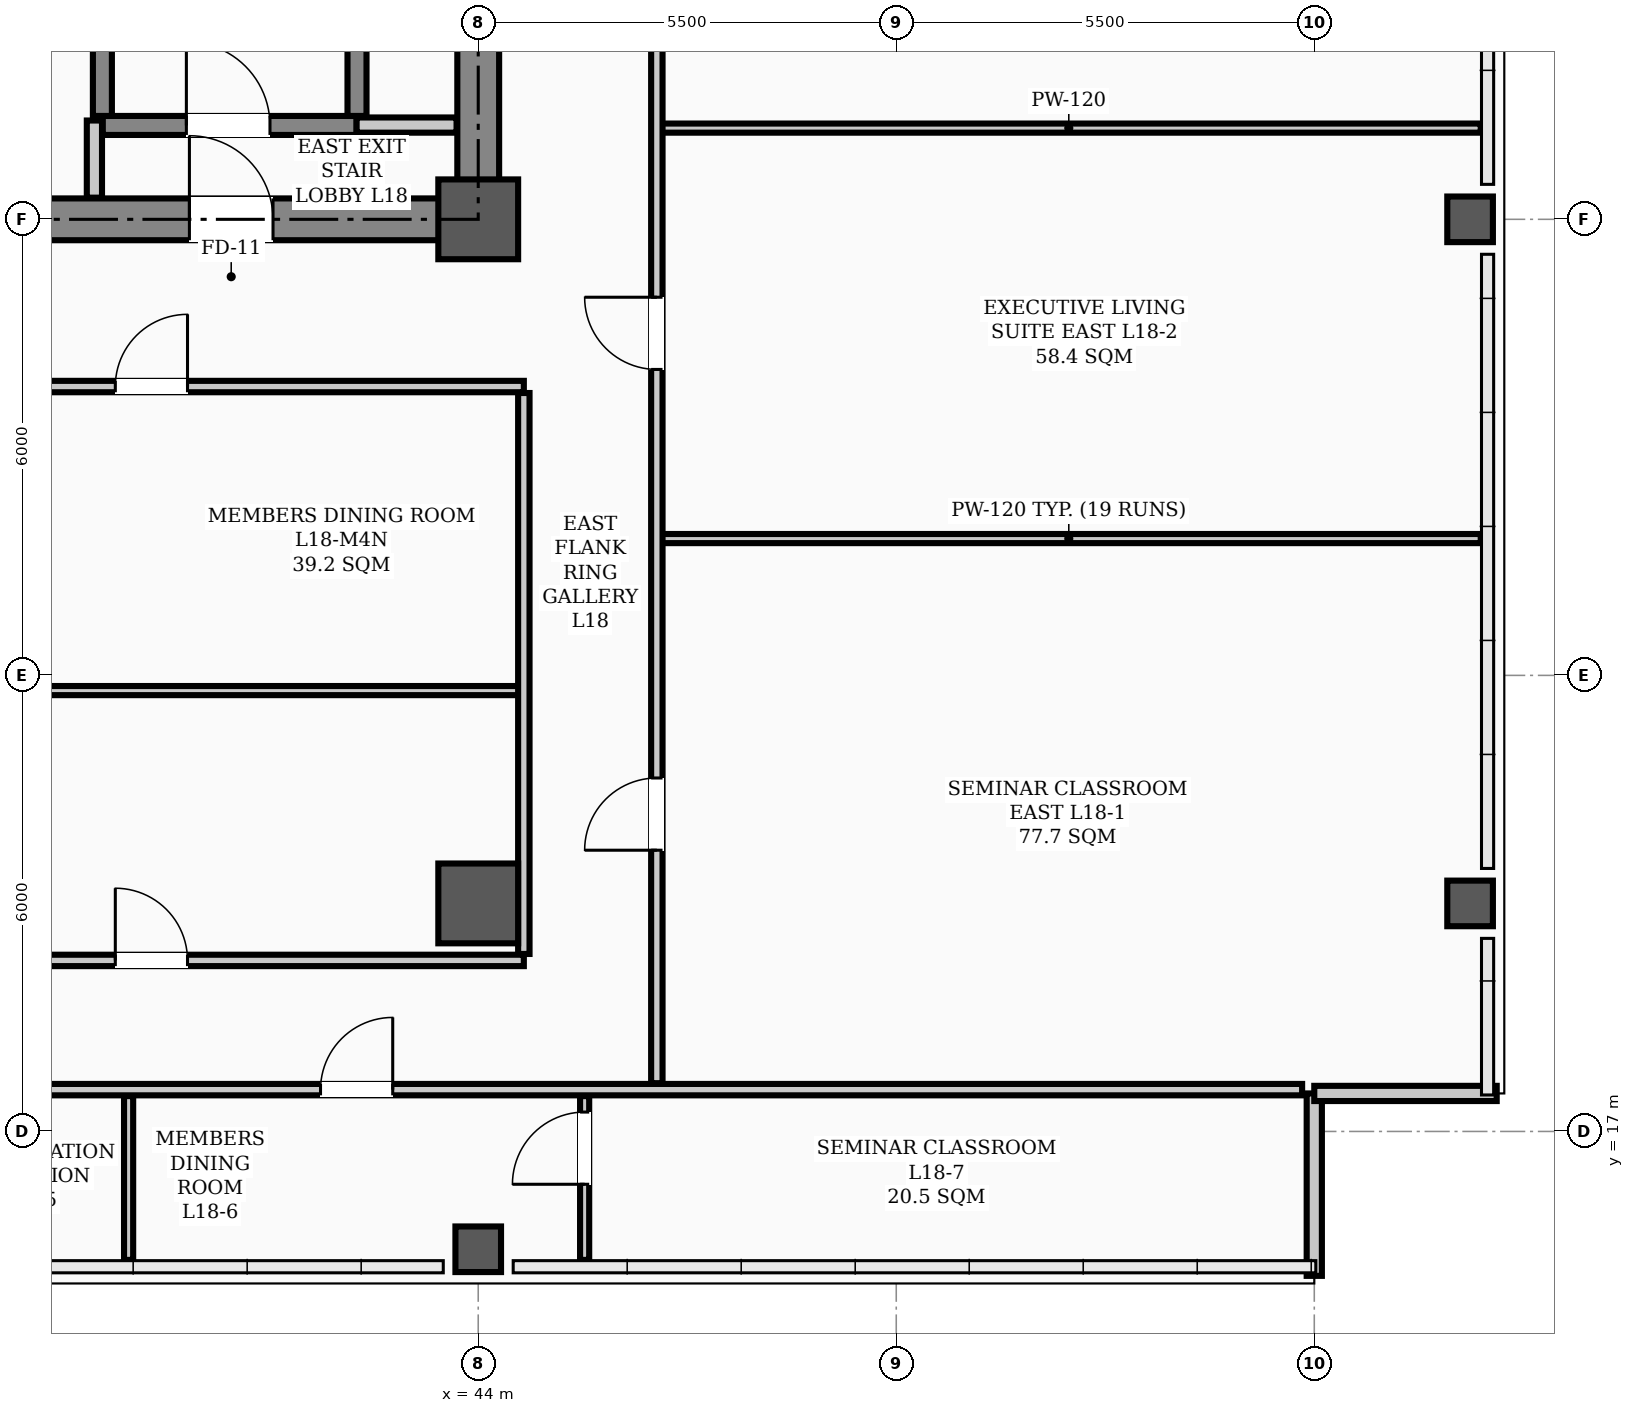
"""IFC4 building model, lengths in metres.
Left out: names, types, materials, properties, quantities, classifications, styles, units other than length and angle.
Written with IfcOpenShell. Run it as: python <this file> out.ifc"""

import sys

from ifc_helpers import new_model, si_unit, direction, frame, frame_2d, origin, origin_2d, place, context, subcontext, project, spatial, rectangle, hollow_rectangle, extrude, element, fill, save


model = new_model("IFC4")
c1 = context("Model", 3, precision=1e-05, world=origin(), true_north=direction((0.0, 1.0)))
c2 = subcontext(c1, "Body", "Model", "MODEL_VIEW")
j1 = project(units=[si_unit("LENGTHUNIT", "METRE"), si_unit("PLANEANGLEUNIT", "RADIAN")], contexts=[c1])
p1 = place(None, origin())
s1 = spatial("IfcSite", under=j1, at=p1, CompositionType="ELEMENT")
p2 = place(p1, origin())
s2 = spatial("IfcBuilding", under=s1, at=p2, CompositionType="ELEMENT")
p3 = place(p2, frame((0.0, 0.0, 73.3)))
s3 = spatial("IfcBuildingStorey", under=s2, at=p3, CompositionType="ELEMENT", Elevation=73.3)
for number, where, z_axis, x_axis in (
    (1, (44.0, 29.0, 0.0), (0.0, 0.0, 1.0), (1.0, 0.0, 0.0)),
    (2, (44.0, 20.0, 0.0), (0.0, 0.0, 1.0), (1.0, 0.0, 0.0)),
):
    element("IfcColumn", number, at=place(p3, frame(where, z_axis=z_axis, x_axis=x_axis)), inside=s3, PredefinedType="COLUMN", context=c2, shape_type="SweptSolid", body=[
        extrude(hollow_rectangle(XDim=1.05, YDim=1.05, WallThickness=0.038, InnerFilletRadius=0.019, OuterFilletRadius=0.057, at=origin_2d()), origin(), (0.0, 0.0, 1.0), 3.9),
    ])
for number, where, z_axis, x_axis in (
    (3, (44.0, 15.45, 0.0), (0.0, 0.0, 1.0), (1.0, 0.0, 0.0)),
    (4, (57.05, 20.0, 0.0), (0.0, 0.0, 1.0), (1.0, 0.0, 0.0)),
    (5, (57.05, 29.0, 0.0), (0.0, 0.0, 1.0), (1.0, 0.0, 0.0)),
):
    element("IfcColumn", number, at=place(p3, frame(where, z_axis=z_axis, x_axis=x_axis)), inside=s3, PredefinedType="COLUMN", context=c2, shape_type="SweptSolid", body=[
        extrude(hollow_rectangle(XDim=0.6, YDim=0.6, WallThickness=0.026, InnerFilletRadius=0.013, OuterFilletRadius=0.039, at=origin_2d()), origin(), (0.0, 0.0, 1.0), 3.9),
    ])
for number, where, z_axis, x_axis in (
    (6, (55.0, 15.1, 0.0), (0.0, 0.0, 1.0), (0.0, 1.0, 0.0)),
    (7, (55.0, 17.5, 0.0), (0.0, 0.0, 1.0), (1.0, 0.0, 0.0)),
):
    element("IfcWall", number, at=place(p3, frame(where, z_axis=z_axis, x_axis=x_axis)), inside=s3, PredefinedType="PARAPET", context=c2, shape_type="SweptSolid", body=[
        extrude(rectangle(XDim=2.4, YDim=0.2, at=frame_2d((1.2, 0.0))), origin(), (0.0, 0.0, 1.0), 1.2),
    ])
p4 = place(p3, frame((13.5, 29.0, 0.0), z_axis=(0.0, 0.0, 1.0), x_axis=(1.0, 0.0, 0.0)))
e8 = element("IfcWall", 8, at=p4, inside=s3, PredefinedType="SHEAR", context=c2, shape_type="SweptSolid", body=[
    extrude(rectangle(XDim=30.5, YDim=0.55, at=frame_2d((15.25, 0.0))), origin(), (0.0, 0.0, 1.0), 3.72),
])
p5 = place(p4, frame((1.75, 0.0, 0.0)))
e9 = element("IfcOpeningElement", 9, at=p5, cuts=e8, PredefinedType="OPENING", context=c2, shape_type="SweptSolid", body=[
    extrude(rectangle(XDim=1.1, YDim=2.08, at=frame_2d((0.55, 1.04))), frame((0.0, 0.285, 0.0), z_axis=(0.0, -1.0, 0.0), x_axis=(1.0, 0.0, 0.0)), (0.0, 0.0, 1.0), 0.57),
])
p6 = place(p4, frame((26.7, 0.0, 0.0)))
e10 = element("IfcOpeningElement", 10, at=p6, cuts=e8, PredefinedType="OPENING", context=c2, shape_type="SweptSolid", body=[
    extrude(rectangle(XDim=1.1, YDim=2.08, at=frame_2d((0.55, 1.04))), frame((0.0, 0.285, 0.0), z_axis=(0.0, -1.0, 0.0), x_axis=(1.0, 0.0, 0.0)), (0.0, 0.0, 1.0), 0.57),
])
p7 = place(p4, frame((6.8, 0.0, 0.0)))
e11 = element("IfcOpeningElement", 11, at=p7, cuts=e8, PredefinedType="OPENING", context=c2, shape_type="SweptSolid", body=[
    extrude(rectangle(XDim=1.1, YDim=2.08, at=frame_2d((0.55, 1.04))), frame((0.0, 0.285, 0.0), z_axis=(0.0, -1.0, 0.0), x_axis=(1.0, 0.0, 0.0)), (0.0, 0.0, 1.0), 0.57),
])
p8 = place(p4, frame((13.2, 0.0, 0.0)))
e12 = element("IfcOpeningElement", 12, at=p8, cuts=e8, PredefinedType="OPENING", context=c2, shape_type="SweptSolid", body=[
    extrude(rectangle(XDim=1.6, YDim=2.08, at=frame_2d((0.8, 1.04))), frame((0.0, 0.285, 0.0), z_axis=(0.0, -1.0, 0.0), x_axis=(1.0, 0.0, 0.0)), (0.0, 0.0, 1.0), 0.57),
])
p9 = place(p4, frame((20.525, 0.0, 0.0)))
e13 = element("IfcOpeningElement", 13, at=p9, cuts=e8, PredefinedType="OPENING", context=c2, shape_type="SweptSolid", body=[
    extrude(rectangle(XDim=0.95, YDim=2.08, at=frame_2d((0.475, 1.04))), frame((0.0, 0.285, 0.0), z_axis=(0.0, -1.0, 0.0), x_axis=(1.0, 0.0, 0.0)), (0.0, 0.0, 1.0), 0.57),
])
p10 = place(p3, frame((44.0, 29.35, 0.0), z_axis=(0.0, 0.0, 1.0), x_axis=(0.0, 1.0, 0.0)))
e14 = element("IfcWall", 14, at=p10, inside=s3, PredefinedType="SHEAR", context=c2, shape_type="SweptSolid", body=[
    extrude(rectangle(XDim=8.6, YDim=0.55, at=frame_2d((4.3, 0.0))), origin(), (0.0, 0.0, 1.0), 3.72),
])
p11 = place(p3, frame((39.06, 30.235, 0.0), z_axis=(0.0, 0.0, 1.0), x_axis=(1.0, 0.0, 0.0)))
e15 = element("IfcWall", 15, at=p11, inside=s3, PredefinedType="STANDARD", context=c2, shape_type="SweptSolid", body=[
    extrude(rectangle(XDim=3.34, YDim=0.25, at=frame_2d((1.67, 0.0))), origin(), (0.0, 0.0, 1.0), 3.72),
])
p12 = place(p11, frame((1.1, 0.0, 0.0)))
e16 = element("IfcOpeningElement", 16, at=p12, cuts=e15, PredefinedType="OPENING", context=c2, shape_type="SweptSolid", body=[
    extrude(rectangle(XDim=1.1, YDim=2.08, at=frame_2d((0.55, 1.04))), frame((0.0, 0.135, 0.0), z_axis=(0.0, -1.0, 0.0), x_axis=(1.0, 0.0, 0.0)), (0.0, 0.0, 1.0), 0.27),
])
for number, where, z_axis, x_axis in (
    (17, (39.055, 30.36, 0.0), (0.0, 0.0, 1.0), (0.0, 1.0, 0.0)),
    (18, (42.405, 30.36, 0.0), (0.0, 0.0, 1.0), (0.0, 1.0, 0.0)),
):
    element("IfcWall", number, at=place(p3, frame(where, z_axis=z_axis, x_axis=x_axis)), inside=s3, PredefinedType="STANDARD", context=c2, shape_type="SweptSolid", body=[
        extrude(rectangle(XDim=7.184, YDim=0.25, at=frame_2d((3.592, 0.0))), origin(), (0.0, 0.0, 1.0), 3.72),
    ])
p13 = place(p3, frame((42.4, 30.24, 0.0), z_axis=(0.0, 0.0, 1.0), x_axis=(1.0, 0.0, 0.0)))
e19 = element("IfcWall", 19, at=p13, inside=s3, PredefinedType="STANDARD", context=c2, shape_type="SweptSolid", body=[
    extrude(rectangle(XDim=1.315, YDim=0.2, at=frame_2d((0.658, 0.0))), origin(), (0.0, 0.0, 1.0), 3.1),
])
p14 = place(p3, frame((12.9, 26.8, 0.0), z_axis=(0.0, 0.0, 1.0), x_axis=(1.0, 0.0, 0.0)))
e20 = element("IfcWall", 20, at=p14, inside=s3, PredefinedType="PARTITIONING", context=c2, shape_type="SweptSolid", body=[
    extrude(rectangle(XDim=31.7, YDim=0.15, at=frame_2d((15.85, 0.0))), origin(), (0.0, 0.0, 1.0), 3.1),
])
p15 = place(p14, frame((13.6, 0.0, 0.0)))
e21 = element("IfcOpeningElement", 21, at=p15, cuts=e20, PredefinedType="OPENING", context=c2, shape_type="SweptSolid", body=[
    extrude(rectangle(XDim=1.6, YDim=2.08, at=frame_2d((0.8, 1.04))), frame((0.0, 0.085, 0.0), z_axis=(0.0, -1.0, 0.0), x_axis=(1.0, 0.0, 0.0)), (0.0, 0.0, 1.0), 0.17),
])
p16 = place(p14, frame((2.475, 0.0, 0.0)))
e22 = element("IfcOpeningElement", 22, at=p16, cuts=e20, PredefinedType="OPENING", context=c2, shape_type="SweptSolid", body=[
    extrude(rectangle(XDim=0.95, YDim=2.08, at=frame_2d((0.475, 1.04))), frame((0.0, 0.085, 0.0), z_axis=(0.0, -1.0, 0.0), x_axis=(1.0, 0.0, 0.0)), (0.0, 0.0, 1.0), 0.17),
])
p17 = place(p14, frame((9.125, 0.0, 0.0)))
e23 = element("IfcOpeningElement", 23, at=p17, cuts=e20, PredefinedType="OPENING", context=c2, shape_type="SweptSolid", body=[
    extrude(rectangle(XDim=0.95, YDim=2.08, at=frame_2d((0.475, 1.04))), frame((0.0, 0.085, 0.0), z_axis=(0.0, -1.0, 0.0), x_axis=(1.0, 0.0, 0.0)), (0.0, 0.0, 1.0), 0.17),
])
p18 = place(p14, frame((19.125, 0.0, 0.0)))
e24 = element("IfcOpeningElement", 24, at=p18, cuts=e20, PredefinedType="OPENING", context=c2, shape_type="SweptSolid", body=[
    extrude(rectangle(XDim=0.95, YDim=2.08, at=frame_2d((0.475, 1.04))), frame((0.0, 0.085, 0.0), z_axis=(0.0, -1.0, 0.0), x_axis=(1.0, 0.0, 0.0)), (0.0, 0.0, 1.0), 0.17),
])
p19 = place(p14, frame((26.325, 0.0, 0.0)))
e25 = element("IfcOpeningElement", 25, at=p19, cuts=e20, PredefinedType="OPENING", context=c2, shape_type="SweptSolid", body=[
    extrude(rectangle(XDim=0.95, YDim=2.08, at=frame_2d((0.475, 1.04))), frame((0.0, 0.085, 0.0), z_axis=(0.0, -1.0, 0.0), x_axis=(1.0, 0.0, 0.0)), (0.0, 0.0, 1.0), 0.17),
])
p20 = place(p3, frame((10.16, 17.55, 0.0), z_axis=(0.0, 0.0, 1.0), x_axis=(1.0, 0.0, 0.0)))
e26 = element("IfcWall", 26, at=p20, inside=s3, PredefinedType="PARTITIONING", context=c2, shape_type="SweptSolid", body=[
    extrude(rectangle(XDim=44.68, YDim=0.15, at=frame_2d((22.34, 0.0))), origin(), (0.0, 0.0, 1.0), 3.1),
])
p21 = place(p20, frame((2.04, 0.0, 0.0)))
e27 = element("IfcOpeningElement", 27, at=p21, cuts=e26, PredefinedType="OPENING", context=c2, shape_type="SweptSolid", body=[
    extrude(rectangle(XDim=0.95, YDim=2.08, at=frame_2d((0.475, 1.04))), frame((0.0, 0.085, 0.0), z_axis=(0.0, -1.0, 0.0), x_axis=(1.0, 0.0, 0.0)), (0.0, 0.0, 1.0), 0.17),
])
p22 = place(p20, frame((6.565, 0.0, 0.0)))
e28 = element("IfcOpeningElement", 28, at=p22, cuts=e26, PredefinedType="OPENING", context=c2, shape_type="SweptSolid", body=[
    extrude(rectangle(XDim=0.95, YDim=2.08, at=frame_2d((0.475, 1.04))), frame((0.0, 0.085, 0.0), z_axis=(0.0, -1.0, 0.0), x_axis=(1.0, 0.0, 0.0)), (0.0, 0.0, 1.0), 0.17),
])
p23 = place(p20, frame((11.865, 0.0, 0.0)))
e29 = element("IfcOpeningElement", 29, at=p23, cuts=e26, PredefinedType="OPENING", context=c2, shape_type="SweptSolid", body=[
    extrude(rectangle(XDim=0.95, YDim=2.08, at=frame_2d((0.475, 1.04))), frame((0.0, 0.085, 0.0), z_axis=(0.0, -1.0, 0.0), x_axis=(1.0, 0.0, 0.0)), (0.0, 0.0, 1.0), 0.17),
])
p24 = place(p20, frame((24.665, 0.0, 0.0)))
e30 = element("IfcOpeningElement", 30, at=p24, cuts=e26, PredefinedType="OPENING", context=c2, shape_type="SweptSolid", body=[
    extrude(rectangle(XDim=0.95, YDim=2.08, at=frame_2d((0.475, 1.04))), frame((0.0, 0.085, 0.0), z_axis=(0.0, -1.0, 0.0), x_axis=(1.0, 0.0, 0.0)), (0.0, 0.0, 1.0), 0.17),
])
p25 = place(p20, frame((31.765, 0.0, 0.0)))
e31 = element("IfcOpeningElement", 31, at=p25, cuts=e26, PredefinedType="OPENING", context=c2, shape_type="SweptSolid", body=[
    extrude(rectangle(XDim=0.95, YDim=2.08, at=frame_2d((0.475, 1.04))), frame((0.0, 0.085, 0.0), z_axis=(0.0, -1.0, 0.0), x_axis=(1.0, 0.0, 0.0)), (0.0, 0.0, 1.0), 0.17),
])
p26 = place(p3, frame((28.4, 19.25, 0.0), z_axis=(0.0, 0.0, 1.0), x_axis=(1.0, 0.0, 0.0)))
e32 = element("IfcWall", 32, at=p26, inside=s3, PredefinedType="PARTITIONING", context=c2, shape_type="SweptSolid", body=[
    extrude(rectangle(XDim=16.2, YDim=0.15, at=frame_2d((8.1, 0.0))), origin(), (0.0, 0.0, 1.0), 3.1),
])
p27 = place(p26, frame((3.625, 0.0, 0.0)))
e33 = element("IfcOpeningElement", 33, at=p27, cuts=e32, PredefinedType="OPENING", context=c2, shape_type="SweptSolid", body=[
    extrude(rectangle(XDim=0.95, YDim=2.08, at=frame_2d((0.475, 1.04))), frame((0.0, 0.085, 0.0), z_axis=(0.0, -1.0, 0.0), x_axis=(1.0, 0.0, 0.0)), (0.0, 0.0, 1.0), 0.17),
])
p28 = place(p26, frame((10.825, 0.0, 0.0)))
e34 = element("IfcOpeningElement", 34, at=p28, cuts=e32, PredefinedType="OPENING", context=c2, shape_type="SweptSolid", body=[
    extrude(rectangle(XDim=0.95, YDim=2.08, at=frame_2d((0.475, 1.04))), frame((0.0, 0.085, 0.0), z_axis=(0.0, -1.0, 0.0), x_axis=(1.0, 0.0, 0.0)), (0.0, 0.0, 1.0), 0.17),
])
p29 = place(p3, frame((34.8, 22.8, 0.0), z_axis=(0.0, 0.0, 1.0), x_axis=(1.0, 0.0, 0.0)))
e35 = element("IfcWall", 35, at=p29, inside=s3, PredefinedType="PARTITIONING", context=c2, shape_type="SweptSolid", body=[
    extrude(rectangle(XDim=9.8, YDim=0.12, at=frame_2d((4.9, 0.0))), origin(), (0.0, 0.0, 1.0), 3.1),
])
for number, where, z_axis, x_axis in (
    (36, (46.35, 24.8, 0.0), (0.0, 0.0, 1.0), (1.0, 0.0, 0.0)),
    (37, (46.35, 30.2, 0.0), (0.0, 0.0, 1.0), (1.0, 0.0, 0.0)),
):
    element("IfcWall", number, at=place(p3, frame(where, z_axis=z_axis, x_axis=x_axis)), inside=s3, PredefinedType="PARTITIONING", context=c2, shape_type="SweptSolid", body=[
        extrude(rectangle(XDim=10.84, YDim=0.12, at=frame_2d((5.42, 0.0))), origin(), (0.0, 0.0, 1.0), 3.212),
    ])
p30 = place(p3, frame((38.95, 29.285, 0.0), z_axis=(0.0, 0.0, 1.0), x_axis=(0.0, 1.0, 0.0)))
e38 = element("IfcWall", 38, at=p30, inside=s3, PredefinedType="STANDARD", context=c2, shape_type="SweptSolid", body=[
    extrude(rectangle(XDim=1.015, YDim=0.2, at=frame_2d((0.508, 0.0))), origin(), (0.0, 0.0, 1.0), 3.3),
])
p31 = place(p3, frame((46.35, 17.635, 0.0), z_axis=(0.0, 0.0, 1.0), x_axis=(0.0, 1.0, 0.0)))
e39 = element("IfcWall", 39, at=p31, inside=s3, PredefinedType="PARTITIONING", context=c2, shape_type="SweptSolid", body=[
    extrude(rectangle(XDim=22.53, YDim=0.15, at=frame_2d((11.265, 0.0))), origin(), (0.0, 0.0, 1.0), 3.0),
])
p32 = place(p31, frame((3.065, 0.0, 0.0)))
e40 = element("IfcOpeningElement", 40, at=p32, cuts=e39, PredefinedType="OPENING", context=c2, shape_type="SweptSolid", body=[
    extrude(rectangle(XDim=0.95, YDim=2.08, at=frame_2d((0.475, 1.04))), frame((0.0, 0.085, 0.0), z_axis=(0.0, -1.0, 0.0), x_axis=(1.0, 0.0, 0.0)), (0.0, 0.0, 1.0), 0.17),
])
p33 = place(p31, frame((9.39, 0.0, 0.0)))
e41 = element("IfcOpeningElement", 41, at=p33, cuts=e39, PredefinedType="OPENING", context=c2, shape_type="SweptSolid", body=[
    extrude(rectangle(XDim=0.95, YDim=2.08, at=frame_2d((0.475, 1.04))), frame((0.0, 0.085, 0.0), z_axis=(0.0, -1.0, 0.0), x_axis=(1.0, 0.0, 0.0)), (0.0, 0.0, 1.0), 0.17),
])
p34 = place(p31, frame((14.69, 0.0, 0.0)))
e42 = element("IfcOpeningElement", 42, at=p34, cuts=e39, PredefinedType="OPENING", context=c2, shape_type="SweptSolid", body=[
    extrude(rectangle(XDim=0.95, YDim=2.08, at=frame_2d((0.475, 1.04))), frame((0.0, 0.085, 0.0), z_axis=(0.0, -1.0, 0.0), x_axis=(1.0, 0.0, 0.0)), (0.0, 0.0, 1.0), 0.17),
])
p35 = place(p31, frame((19.715, 0.0, 0.0)))
e43 = element("IfcOpeningElement", 43, at=p35, cuts=e39, PredefinedType="OPENING", context=c2, shape_type="SweptSolid", body=[
    extrude(rectangle(XDim=0.95, YDim=2.08, at=frame_2d((0.475, 1.04))), frame((0.0, 0.085, 0.0), z_axis=(0.0, -1.0, 0.0), x_axis=(1.0, 0.0, 0.0)), (0.0, 0.0, 1.0), 0.17),
])
p36 = place(p3, frame((44.6, 19.335, 0.0), z_axis=(0.0, 0.0, 1.0), x_axis=(0.0, 1.0, 0.0)))
e44 = element("IfcWall", 44, at=p36, inside=s3, PredefinedType="PARTITIONING", context=c2, shape_type="SweptSolid", body=[
    extrude(rectangle(XDim=7.38, YDim=0.15, at=frame_2d((3.69, 0.0))), origin(), (0.0, 0.0, 1.0), 3.0),
])
p37 = place(p3, frame((39.4, 15.31, 0.0), z_axis=(0.0, 0.0, 1.0), x_axis=(0.0, 1.0, 0.0)))
e45 = element("IfcWall", 45, at=p37, inside=s3, PredefinedType="PARTITIONING", context=c2, shape_type="SweptSolid", body=[
    extrude(rectangle(XDim=2.155, YDim=0.12, at=frame_2d((1.078, 0.0))), origin(), (0.0, 0.0, 1.0), 3.212),
])
p38 = place(p3, frame((45.4, 15.31, 0.0), z_axis=(0.0, 0.0, 1.0), x_axis=(0.0, 1.0, 0.0)))
e46 = element("IfcWall", 46, at=p38, inside=s3, PredefinedType="PARTITIONING", context=c2, shape_type="SweptSolid", body=[
    extrude(rectangle(XDim=2.155, YDim=0.12, at=frame_2d((1.078, 0.0))), origin(), (0.0, 0.0, 1.0), 3.72),
])
p39 = place(p38, frame((0.995, 0.0, 0.0)))
e47 = element("IfcOpeningElement", 47, at=p39, cuts=e46, PredefinedType="OPENING", context=c2, shape_type="SweptSolid", body=[
    extrude(rectangle(XDim=0.95, YDim=2.08, at=frame_2d((0.475, 1.04))), frame((0.0, 0.07, 0.0), z_axis=(0.0, -1.0, 0.0), x_axis=(1.0, 0.0, 0.0)), (0.0, 0.0, 1.0), 0.14),
])
p40 = place(p12, origin())
e48 = element("IfcDoor", 48, at=p40, inside=s3, OperationType="SINGLE_SWING_LEFT", PredefinedType="DOOR", context=c2, shape_type="SweptSolid", body=[
    extrude(rectangle(XDim=1.1, YDim=2.08, at=frame_2d((0.55, 1.04))), frame((0.0, 0.025, 0.0), z_axis=(0.0, -1.0, 0.0), x_axis=(1.0, 0.0, 0.0)), (0.0, 0.0, 1.0), 0.05),
])
fill(e16, e48)
p41 = place(p6, origin())
e49 = element("IfcDoor", 49, at=p41, inside=s3, OperationType="SINGLE_SWING_LEFT", PredefinedType="DOOR", context=c2, shape_type="SweptSolid", body=[
    extrude(rectangle(XDim=1.1, YDim=2.08, at=frame_2d((0.55, 1.04))), frame((0.0, 0.025, 0.0), z_axis=(0.0, -1.0, 0.0), x_axis=(1.0, 0.0, 0.0)), (0.0, 0.0, 1.0), 0.05),
])
fill(e10, e49)
p42 = place(p25, origin())
e50 = element("IfcDoor", 50, at=p42, inside=s3, OperationType="SINGLE_SWING_RIGHT", PredefinedType="DOOR", context=c2, shape_type="SweptSolid", body=[
    extrude(rectangle(XDim=0.95, YDim=2.08, at=frame_2d((0.475, 1.04))), frame((0.0, 0.025, 0.0), z_axis=(0.0, -1.0, 0.0), x_axis=(1.0, 0.0, 0.0)), (0.0, 0.0, 1.0), 0.05),
])
fill(e31, e50)
p43 = place(p39, origin())
e51 = element("IfcDoor", 51, at=p43, inside=s3, OperationType="SINGLE_SWING_LEFT", PredefinedType="DOOR", context=c2, shape_type="SweptSolid", body=[
    extrude(rectangle(XDim=0.95, YDim=2.08, at=frame_2d((0.475, 1.04))), frame((0.0, 0.025, 0.0), z_axis=(0.0, -1.0, 0.0), x_axis=(1.0, 0.0, 0.0)), (0.0, 0.0, 1.0), 0.05),
])
fill(e47, e51)
p44 = place(p19, origin())
e52 = element("IfcDoor", 52, at=p44, inside=s3, OperationType="SINGLE_SWING_RIGHT", PredefinedType="DOOR", context=c2, shape_type="SweptSolid", body=[
    extrude(rectangle(XDim=0.95, YDim=2.08, at=frame_2d((0.475, 1.04))), frame((0.0, 0.025, 0.0), z_axis=(0.0, -1.0, 0.0), x_axis=(1.0, 0.0, 0.0)), (0.0, 0.0, 1.0), 0.05),
])
fill(e25, e52)
p45 = place(p28, origin())
e53 = element("IfcDoor", 53, at=p45, inside=s3, OperationType="SINGLE_SWING_LEFT", PredefinedType="DOOR", context=c2, shape_type="SweptSolid", body=[
    extrude(rectangle(XDim=0.95, YDim=2.08, at=frame_2d((0.475, 1.04))), frame((0.0, 0.025, 0.0), z_axis=(0.0, -1.0, 0.0), x_axis=(1.0, 0.0, 0.0)), (0.0, 0.0, 1.0), 0.05),
])
fill(e34, e53)
p46 = place(p32, origin())
e54 = element("IfcDoor", 54, at=p46, inside=s3, OperationType="SINGLE_SWING_LEFT", PredefinedType="DOOR", context=c2, shape_type="SweptSolid", body=[
    extrude(rectangle(XDim=0.95, YDim=2.08, at=frame_2d((0.475, 1.04))), frame((0.0, 0.025, 0.0), z_axis=(0.0, -1.0, 0.0), x_axis=(1.0, 0.0, 0.0)), (0.0, 0.0, 1.0), 0.05),
])
fill(e40, e54)
p47 = place(p33, origin())
e55 = element("IfcDoor", 55, at=p47, inside=s3, OperationType="SINGLE_SWING_RIGHT", PredefinedType="DOOR", context=c2, shape_type="SweptSolid", body=[
    extrude(rectangle(XDim=0.95, YDim=2.08, at=frame_2d((0.475, 1.04))), frame((0.0, 0.025, 0.0), z_axis=(0.0, -1.0, 0.0), x_axis=(1.0, 0.0, 0.0)), (0.0, 0.0, 1.0), 0.05),
])
fill(e41, e55)
save(model, sys.argv[1])
